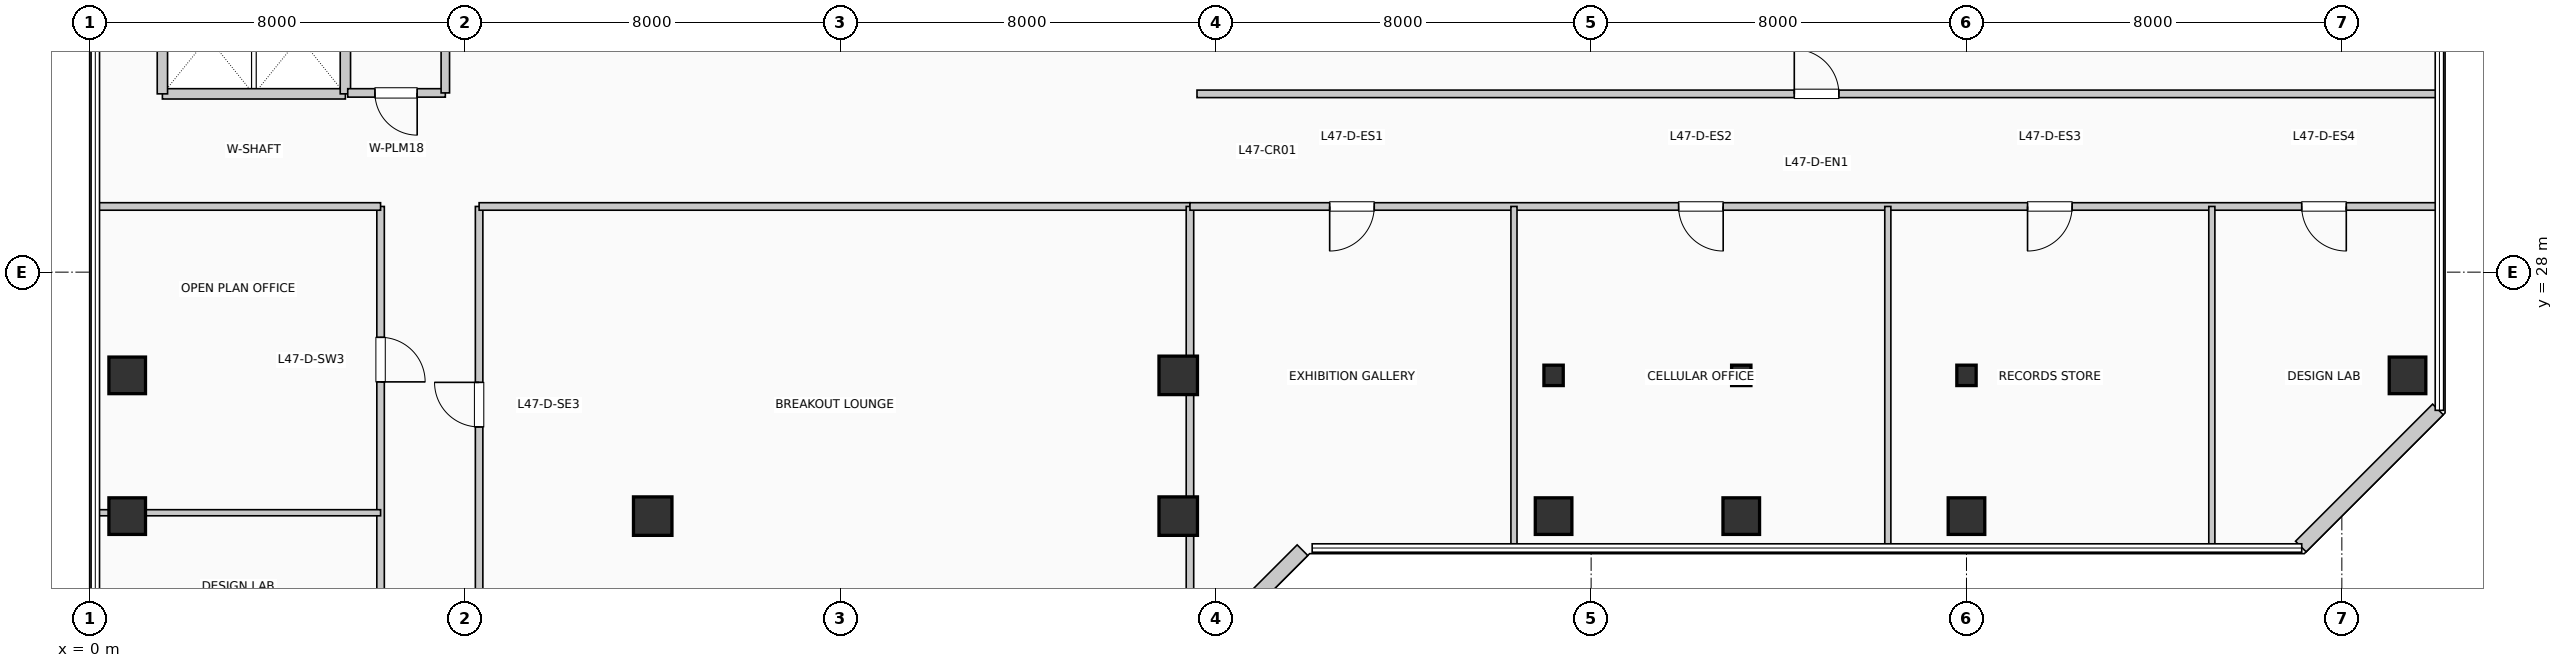
"""IFC4 building model, lengths in metres.
Left out: names, types, materials, properties, quantities, classifications, styles, units other than length and angle.
Written with IfcOpenShell. Run it as: python <this file> out.ifc"""

import sys

from ifc_helpers import new_model, si_unit, direction, frame, frame_2d, origin, origin_2d, place, context, subcontext, project, spatial, rectangle, i_section, extrude, element, fill, save


model = new_model("IFC4")
c1 = context("Model", 3, precision=1e-05, world=origin(), true_north=direction((0.0, 1.0)))
c2 = subcontext(c1, "Body", "Model", "MODEL_VIEW")
j1 = project(units=[si_unit("LENGTHUNIT", "METRE"), si_unit("PLANEANGLEUNIT", "RADIAN")], contexts=[c1])
p1 = place(None, origin())
s1 = spatial("IfcSite", under=j1, at=p1, CompositionType="ELEMENT")
p2 = place(p1, origin())
s2 = spatial("IfcBuilding", under=s1, at=p2, CompositionType="ELEMENT")
p3 = place(p2, frame((0.0, 0.0, 195.36)))
s3 = spatial("IfcBuildingStorey", under=s2, at=p3, CompositionType="ELEMENT", Elevation=195.36)
for number, where, z_axis, x_axis in (
    (1, (0.8, 22.8, 0.0), (0.0, 0.0, 1.0), (1.0, 0.0, 0.0)),
    (2, (0.8, 25.8, 0.0), (0.0, 0.0, 1.0), (1.0, 0.0, 0.0)),
):
    element("IfcColumn", number, at=place(p3, frame(where, z_axis=z_axis, x_axis=x_axis)), inside=s3, PredefinedType="COLUMN", context=c2, shape_type="SweptSolid", body=[
        extrude(rectangle(XDim=0.78, YDim=0.78, at=origin_2d()), origin(), (0.0, 0.0, 1.0), 3.96),
    ])
for number, where, z_axis, x_axis in (
    (3, (12.0, 22.8, 0.0), (0.0, 0.0, 1.0), (1.0, 0.0, 0.0)),
    (4, (23.2, 22.8, 0.0), (0.0, 0.0, 1.0), (1.0, 0.0, 0.0)),
    (5, (23.2, 25.8, 0.0), (0.0, 0.0, 1.0), (1.0, 0.0, 0.0)),
):
    element("IfcColumn", number, at=place(p3, frame(where, z_axis=z_axis, x_axis=x_axis)), inside=s3, PredefinedType="COLUMN", context=c2, shape_type="SweptSolid", body=[
        extrude(rectangle(XDim=0.82, YDim=0.82, at=origin_2d()), origin(), (0.0, 0.0, 1.0), 3.96),
    ])
p4 = place(p3, frame((31.2, 22.8, 0.0), z_axis=(0.0, 0.0, 1.0), x_axis=(1.0, 0.0, 0.0)))
e6 = element("IfcColumn", 6, at=p4, inside=s3, PredefinedType="COLUMN", context=c2, shape_type="SweptSolid", body=[
    extrude(rectangle(XDim=0.78, YDim=0.78, at=origin_2d()), origin(), (0.0, 0.0, 1.0), 3.96),
])
p5 = place(p3, frame((31.2, 25.8, 0.0), z_axis=(0.0, 0.0, 1.0), x_axis=(1.0, 0.0, 0.0)))
e7 = element("IfcColumn", 7, at=p5, inside=s3, PredefinedType="COLUMN", context=c2, shape_type="SweptSolid", body=[
    extrude(i_section(OverallWidth=0.412, OverallDepth=0.435, WebThickness=0.027, FlangeThickness=0.043, at=origin_2d()), origin(), (0.0, 0.0, 1.0), 3.96),
])
p6 = place(p3, frame((35.2, 22.8, 0.0), z_axis=(0.0, 0.0, 1.0), x_axis=(1.0, 0.0, 0.0)))
e8 = element("IfcColumn", 8, at=p6, inside=s3, PredefinedType="COLUMN", context=c2, shape_type="SweptSolid", body=[
    extrude(rectangle(XDim=0.78, YDim=0.78, at=origin_2d()), origin(), (0.0, 0.0, 1.0), 3.96),
])
p7 = place(p3, frame((35.2, 25.8, 0.0), z_axis=(0.0, 0.0, 1.0), x_axis=(1.0, 0.0, 0.0)))
e9 = element("IfcColumn", 9, at=p7, inside=s3, PredefinedType="COLUMN", context=c2, shape_type="SweptSolid", body=[
    extrude(i_section(OverallWidth=0.412, OverallDepth=0.435, WebThickness=0.027, FlangeThickness=0.043, at=origin_2d()), origin(), (0.0, 0.0, 1.0), 3.96),
])
p8 = place(p3, frame((40.0, 22.8, 0.0), z_axis=(0.0, 0.0, 1.0), x_axis=(1.0, 0.0, 0.0)))
e10 = element("IfcColumn", 10, at=p8, inside=s3, PredefinedType="COLUMN", context=c2, shape_type="SweptSolid", body=[
    extrude(rectangle(XDim=0.78, YDim=0.78, at=origin_2d()), origin(), (0.0, 0.0, 1.0), 3.96),
])
p9 = place(p3, frame((40.0, 25.8, 0.0), z_axis=(0.0, 0.0, 1.0), x_axis=(1.0, 0.0, 0.0)))
e11 = element("IfcColumn", 11, at=p9, inside=s3, PredefinedType="COLUMN", context=c2, shape_type="SweptSolid", body=[
    extrude(i_section(OverallWidth=0.412, OverallDepth=0.435, WebThickness=0.027, FlangeThickness=0.043, at=origin_2d()), origin(), (0.0, 0.0, 1.0), 3.96),
])
p10 = place(p3, frame((49.4, 25.8, 0.0), z_axis=(0.0, 0.0, 1.0), x_axis=(1.0, 0.0, 0.0)))
e12 = element("IfcColumn", 12, at=p10, inside=s3, PredefinedType="COLUMN", context=c2, shape_type="SweptSolid", body=[
    extrude(rectangle(XDim=0.78, YDim=0.78, at=origin_2d()), origin(), (0.0, 0.0, 1.0), 3.96),
])
p11 = place(p3, frame((23.926, 20.152, 0.0), z_axis=(0.0, 0.0, 1.0), x_axis=(0.707106781187, 0.707106781187, 0.0)))
e13 = element("IfcWall", 13, at=p11, inside=s3, PredefinedType="SOLIDWALL", context=c2, shape_type="SweptSolid", body=[
    extrude(rectangle(XDim=2.718, YDim=0.32, at=frame_2d((1.359, 0.0))), origin(), (0.0, 0.0, 1.0), 3.71),
])
p12 = place(p3, frame((47.126, 22.152, 0.0), z_axis=(0.0, 0.0, 1.0), x_axis=(0.707136318428, 0.707077242712, 0.0)))
e14 = element("IfcWall", 14, at=p12, inside=s3, PredefinedType="SOLIDWALL", context=c2, shape_type="SweptSolid", body=[
    extrude(rectangle(XDim=4.133, YDim=0.32, at=frame_2d((2.066, 0.0))), origin(), (0.0, 0.0, 1.0), 3.71),
])
p13 = place(p3, frame((1.55, 31.8, 0.0), z_axis=(0.0, 0.0, 1.0), x_axis=(1.0, 0.0, 0.0)))
e15 = element("IfcWall", 15, at=p13, inside=s3, PredefinedType="PARTITIONING", context=c2, shape_type="SweptSolid", body=[
    extrude(rectangle(XDim=3.9, YDim=0.22, at=frame_2d((1.95, 0.0))), origin(), (0.0, 0.0, 1.0), 3.71),
])
for number, where, z_axis, x_axis in (
    (16, (1.55, 31.8, 0.0), (0.0, 0.0, 1.0), (0.0, 1.0, 0.0)),
    (17, (5.45, 31.8, 0.0), (0.0, 0.0, 1.0), (0.0, 1.0, 0.0)),
):
    element("IfcWall", number, at=place(p3, frame(where, z_axis=z_axis, x_axis=x_axis)), inside=s3, PredefinedType="PARTITIONING", context=c2, shape_type="SweptSolid", body=[
        extrude(rectangle(XDim=2.38, YDim=0.22, at=frame_2d((1.19, 0.0))), origin(), (0.0, 0.0, 1.0), 3.71),
    ])
p14 = place(p3, frame((5.5, 31.82, 0.0), z_axis=(0.0, 0.0, 1.0), x_axis=(1.0, 0.0, 0.0)))
e18 = element("IfcWall", 18, at=p14, inside=s3, PredefinedType="PLUMBINGWALL", context=c2, shape_type="SweptSolid", body=[
    extrude(rectangle(XDim=2.08, YDim=0.18, at=frame_2d((1.04, 0.0))), origin(), (0.0, 0.0, 1.0), 3.71),
])
p15 = place(p14, frame((1.48, 0.0, 0.0), z_axis=(0.0, 0.0, 1.0), x_axis=(-1.0, 0.0, 0.0)))
e19 = element("IfcOpeningElement", 19, at=p15, cuts=e18, PredefinedType="OPENING", context=c2, shape_type="SweptSolid", body=[
    extrude(rectangle(XDim=0.9, YDim=2.1, at=frame_2d((0.45, 1.05))), frame((0.0, 0.1, 0.0), z_axis=(0.0, -1.0, 0.0), x_axis=(1.0, 0.0, 0.0)), (0.0, 0.0, 1.0), 0.2),
])
p16 = place(p3, frame((7.58, 31.82, 0.0), z_axis=(0.0, 0.0, 1.0), x_axis=(0.0, 1.0, 0.0)))
e20 = element("IfcWall", 20, at=p16, inside=s3, PredefinedType="PLUMBINGWALL", context=c2, shape_type="SweptSolid", body=[
    extrude(rectangle(XDim=2.36, YDim=0.18, at=frame_2d((1.18, 0.0))), origin(), (0.0, 0.0, 1.0), 3.71),
])
p17 = place(p3, frame((6.2, 10.2, 0.0), z_axis=(0.0, 0.0, 1.0), x_axis=(0.0, 1.0, 0.0)))
e21 = element("IfcWall", 21, at=p17, inside=s3, PredefinedType="PARTITIONING", context=c2, shape_type="SweptSolid", body=[
    extrude(rectangle(XDim=19.2, YDim=0.16, at=frame_2d((9.6, 0.0))), origin(), (0.0, 0.0, 1.0), 3.71),
])
p18 = place(p17, frame((3.739, 0.0, 0.0), z_axis=(0.0, 0.0, 1.0), x_axis=(-1.0, 0.0, 0.0)))
e22 = element("IfcOpeningElement", 22, at=p18, cuts=e21, PredefinedType="OPENING", context=c2, shape_type="SweptSolid", body=[
    extrude(rectangle(XDim=0.95, YDim=2.15, at=frame_2d((0.475, 1.075))), frame((0.0, 0.09, 0.0), z_axis=(0.0, -1.0, 0.0), x_axis=(1.0, 0.0, 0.0)), (0.0, 0.0, 1.0), 0.18),
])
p19 = place(p17, frame((10.075, 0.0, 0.0), z_axis=(0.0, 0.0, 1.0), x_axis=(-1.0, 0.0, 0.0)))
e23 = element("IfcOpeningElement", 23, at=p19, cuts=e21, PredefinedType="OPENING", context=c2, shape_type="SweptSolid", body=[
    extrude(rectangle(XDim=0.95, YDim=2.15, at=frame_2d((0.475, 1.075))), frame((0.0, 0.09, 0.0), z_axis=(0.0, -1.0, 0.0), x_axis=(1.0, 0.0, 0.0)), (0.0, 0.0, 1.0), 0.18),
])
p20 = place(p17, frame((16.411, 0.0, 0.0), z_axis=(0.0, 0.0, 1.0), x_axis=(-1.0, 0.0, 0.0)))
e24 = element("IfcOpeningElement", 24, at=p20, cuts=e21, PredefinedType="OPENING", context=c2, shape_type="SweptSolid", body=[
    extrude(rectangle(XDim=0.95, YDim=2.15, at=frame_2d((0.475, 1.075))), frame((0.0, 0.09, 0.0), z_axis=(0.0, -1.0, 0.0), x_axis=(1.0, 0.0, 0.0)), (0.0, 0.0, 1.0), 0.18),
])
p21 = place(p3, frame((8.3, 10.2, 0.0), z_axis=(0.0, 0.0, 1.0), x_axis=(0.0, 1.0, 0.0)))
e25 = element("IfcWall", 25, at=p21, inside=s3, PredefinedType="PARTITIONING", context=c2, shape_type="SweptSolid", body=[
    extrude(rectangle(XDim=19.2, YDim=0.16, at=frame_2d((9.6, 0.0))), origin(), (0.0, 0.0, 1.0), 3.71),
])
p22 = place(p21, frame((1.925, 0.0, 0.0)))
e26 = element("IfcOpeningElement", 26, at=p22, cuts=e25, PredefinedType="OPENING", context=c2, shape_type="SweptSolid", body=[
    extrude(rectangle(XDim=0.95, YDim=2.15, at=frame_2d((0.475, 1.075))), frame((0.0, 0.09, 0.0), z_axis=(0.0, -1.0, 0.0), x_axis=(1.0, 0.0, 0.0)), (0.0, 0.0, 1.0), 0.18),
])
p23 = place(p21, frame((7.301, 0.0, 0.0)))
e27 = element("IfcOpeningElement", 27, at=p23, cuts=e25, PredefinedType="OPENING", context=c2, shape_type="SweptSolid", body=[
    extrude(rectangle(XDim=0.95, YDim=2.15, at=frame_2d((0.475, 1.075))), frame((0.0, 0.09, 0.0), z_axis=(0.0, -1.0, 0.0), x_axis=(1.0, 0.0, 0.0)), (0.0, 0.0, 1.0), 0.18),
])
p24 = place(p21, frame((14.501, 0.0, 0.0)))
e28 = element("IfcOpeningElement", 28, at=p24, cuts=e25, PredefinedType="OPENING", context=c2, shape_type="SweptSolid", body=[
    extrude(rectangle(XDim=0.95, YDim=2.15, at=frame_2d((0.475, 1.075))), frame((0.0, 0.09, 0.0), z_axis=(0.0, -1.0, 0.0), x_axis=(1.0, 0.0, 0.0)), (0.0, 0.0, 1.0), 0.18),
])
p25 = place(p3, frame((0.19, 29.4, 0.0), z_axis=(0.0, 0.0, 1.0), x_axis=(1.0, 0.0, 0.0)))
e29 = element("IfcWall", 29, at=p25, inside=s3, PredefinedType="PARTITIONING", context=c2, shape_type="SweptSolid", body=[
    extrude(rectangle(XDim=6.01, YDim=0.16, at=frame_2d((3.005, 0.0))), origin(), (0.0, 0.0, 1.0), 3.365),
])
p26 = place(p3, frame((8.3, 29.4, 0.0), z_axis=(0.0, 0.0, 1.0), x_axis=(1.0, 0.0, 0.0)))
e30 = element("IfcWall", 30, at=p26, inside=s3, PredefinedType="PARTITIONING", context=c2, shape_type="SweptSolid", body=[
    extrude(rectangle(XDim=15.15, YDim=0.16, at=frame_2d((7.575, 0.0))), origin(), (0.0, 0.0, 1.0), 3.365),
])
p27 = place(p3, frame((23.45, 5.99, 0.0), z_axis=(0.0, 0.0, 1.0), x_axis=(0.0, 1.0, 0.0)))
e31 = element("IfcWall", 31, at=p27, inside=s3, PredefinedType="PARTITIONING", context=c2, shape_type="SweptSolid", body=[
    extrude(rectangle(XDim=23.41, YDim=0.16, at=frame_2d((11.705, 0.0))), origin(), (0.0, 0.0, 1.0), 3.095),
])
p28 = place(p3, frame((0.19, 22.872, 0.0), z_axis=(0.0, 0.0, 1.0), x_axis=(1.0, 0.0, 0.0)))
e32 = element("IfcWall", 32, at=p28, inside=s3, PredefinedType="PARTITIONING", context=c2, shape_type="SweptSolid", body=[
    extrude(rectangle(XDim=6.01, YDim=0.13, at=frame_2d((3.005, 0.0))), origin(), (0.0, 0.0, 1.0), 3.095),
])
p29 = place(p3, frame((23.45, 29.4, 0.0), z_axis=(0.0, 0.0, 1.0), x_axis=(1.0, 0.0, 0.0)))
e33 = element("IfcWall", 33, at=p29, inside=s3, PredefinedType="PARTITIONING", context=c2, shape_type="SweptSolid", body=[
    extrude(rectangle(XDim=26.56, YDim=0.16, at=frame_2d((13.28, 0.0))), origin(), (0.0, 0.0, 1.0), 3.365),
])
p30 = place(p29, frame((3.928, 0.0, 0.0), z_axis=(0.0, 0.0, 1.0), x_axis=(-1.0, 0.0, 0.0)))
e34 = element("IfcOpeningElement", 34, at=p30, cuts=e33, PredefinedType="OPENING", context=c2, shape_type="SweptSolid", body=[
    extrude(rectangle(XDim=0.95, YDim=2.15, at=frame_2d((0.475, 1.075))), frame((0.0, 0.09, 0.0), z_axis=(0.0, -1.0, 0.0), x_axis=(1.0, 0.0, 0.0)), (0.0, 0.0, 1.0), 0.18),
])
p31 = place(p29, frame((11.365, 0.0, 0.0), z_axis=(0.0, 0.0, 1.0), x_axis=(-1.0, 0.0, 0.0)))
e35 = element("IfcOpeningElement", 35, at=p31, cuts=e33, PredefinedType="OPENING", context=c2, shape_type="SweptSolid", body=[
    extrude(rectangle(XDim=0.95, YDim=2.15, at=frame_2d((0.475, 1.075))), frame((0.0, 0.09, 0.0), z_axis=(0.0, -1.0, 0.0), x_axis=(1.0, 0.0, 0.0)), (0.0, 0.0, 1.0), 0.18),
])
p32 = place(p29, frame((18.801, 0.0, 0.0), z_axis=(0.0, 0.0, 1.0), x_axis=(-1.0, 0.0, 0.0)))
e36 = element("IfcOpeningElement", 36, at=p32, cuts=e33, PredefinedType="OPENING", context=c2, shape_type="SweptSolid", body=[
    extrude(rectangle(XDim=0.95, YDim=2.15, at=frame_2d((0.475, 1.075))), frame((0.0, 0.09, 0.0), z_axis=(0.0, -1.0, 0.0), x_axis=(1.0, 0.0, 0.0)), (0.0, 0.0, 1.0), 0.18),
])
p33 = place(p29, frame((24.645, 0.0, 0.0), z_axis=(0.0, 0.0, 1.0), x_axis=(-1.0, 0.0, 0.0)))
e37 = element("IfcOpeningElement", 37, at=p33, cuts=e33, PredefinedType="OPENING", context=c2, shape_type="SweptSolid", body=[
    extrude(rectangle(XDim=0.95, YDim=2.15, at=frame_2d((0.475, 1.075))), frame((0.0, 0.09, 0.0), z_axis=(0.0, -1.0, 0.0), x_axis=(1.0, 0.0, 0.0)), (0.0, 0.0, 1.0), 0.18),
])
p34 = place(p3, frame((23.6, 31.8, 0.0), z_axis=(0.0, 0.0, 1.0), x_axis=(1.0, 0.0, 0.0)))
e38 = element("IfcWall", 38, at=p34, inside=s3, PredefinedType="PARTITIONING", context=c2, shape_type="SweptSolid", body=[
    extrude(rectangle(XDim=26.41, YDim=0.16, at=frame_2d((13.205, 0.0))), origin(), (0.0, 0.0, 1.0), 3.71),
])
p35 = place(p34, frame((12.73, 0.0, 0.0)))
e39 = element("IfcOpeningElement", 39, at=p35, cuts=e38, PredefinedType="OPENING", context=c2, shape_type="SweptSolid", body=[
    extrude(rectangle(XDim=0.95, YDim=2.15, at=frame_2d((0.475, 1.075))), frame((0.0, 0.09, 0.0), z_axis=(0.0, -1.0, 0.0), x_axis=(1.0, 0.0, 0.0)), (0.0, 0.0, 1.0), 0.18),
])
for number, where, z_axis, x_axis in (
    (40, (30.356, 22.19, 0.0), (0.0, 0.0, 1.0), (0.0, 1.0, 0.0)),
    (41, (38.323, 22.19, 0.0), (0.0, 0.0, 1.0), (0.0, 1.0, 0.0)),
    (42, (45.229, 22.19, 0.0), (0.0, 0.0, 1.0), (0.0, 1.0, 0.0)),
):
    element("IfcWall", number, at=place(p3, frame(where, z_axis=z_axis, x_axis=x_axis)), inside=s3, PredefinedType="PARTITIONING", context=c2, shape_type="SweptSolid", body=[
        extrude(rectangle(XDim=7.21, YDim=0.13, at=frame_2d((3.605, 0.0))), origin(), (0.0, 0.0, 1.0), 3.71),
    ])
p36 = place(p15, origin())
e43 = element("IfcDoor", 43, at=p36, inside=s3, OperationType="SINGLE_SWING_RIGHT", PredefinedType="DOOR", context=c2, shape_type="SweptSolid", body=[
    extrude(rectangle(XDim=0.9, YDim=2.1, at=frame_2d((0.45, 1.05))), frame((0.0, 0.025, 0.0), z_axis=(0.0, -1.0, 0.0), x_axis=(1.0, 0.0, 0.0)), (0.0, 0.0, 1.0), 0.05),
])
fill(e19, e43)
p37 = place(p20, origin())
e44 = element("IfcDoor", 44, at=p37, inside=s3, OperationType="SINGLE_SWING_LEFT", PredefinedType="DOOR", context=c2, shape_type="SweptSolid", body=[
    extrude(rectangle(XDim=0.95, YDim=2.15, at=frame_2d((0.475, 1.075))), frame((0.0, 0.025, 0.0), z_axis=(0.0, -1.0, 0.0), x_axis=(1.0, 0.0, 0.0)), (0.0, 0.0, 1.0), 0.05),
])
fill(e24, e44)
p38 = place(p24, origin())
e45 = element("IfcDoor", 45, at=p38, inside=s3, OperationType="SINGLE_SWING_RIGHT", PredefinedType="DOOR", context=c2, shape_type="SweptSolid", body=[
    extrude(rectangle(XDim=0.95, YDim=2.15, at=frame_2d((0.475, 1.075))), frame((0.0, 0.025, 0.0), z_axis=(0.0, -1.0, 0.0), x_axis=(1.0, 0.0, 0.0)), (0.0, 0.0, 1.0), 0.05),
])
fill(e28, e45)
p39 = place(p30, origin())
e46 = element("IfcDoor", 46, at=p39, inside=s3, OperationType="SINGLE_SWING_LEFT", PredefinedType="DOOR", context=c2, shape_type="SweptSolid", body=[
    extrude(rectangle(XDim=0.95, YDim=2.15, at=frame_2d((0.475, 1.075))), frame((0.0, 0.025, 0.0), z_axis=(0.0, -1.0, 0.0), x_axis=(1.0, 0.0, 0.0)), (0.0, 0.0, 1.0), 0.05),
])
fill(e34, e46)
p40 = place(p31, origin())
e47 = element("IfcDoor", 47, at=p40, inside=s3, OperationType="SINGLE_SWING_RIGHT", PredefinedType="DOOR", context=c2, shape_type="SweptSolid", body=[
    extrude(rectangle(XDim=0.95, YDim=2.15, at=frame_2d((0.475, 1.075))), frame((0.0, 0.025, 0.0), z_axis=(0.0, -1.0, 0.0), x_axis=(1.0, 0.0, 0.0)), (0.0, 0.0, 1.0), 0.05),
])
fill(e35, e47)
p41 = place(p32, origin())
e48 = element("IfcDoor", 48, at=p41, inside=s3, OperationType="SINGLE_SWING_LEFT", PredefinedType="DOOR", context=c2, shape_type="SweptSolid", body=[
    extrude(rectangle(XDim=0.95, YDim=2.15, at=frame_2d((0.475, 1.075))), frame((0.0, 0.025, 0.0), z_axis=(0.0, -1.0, 0.0), x_axis=(1.0, 0.0, 0.0)), (0.0, 0.0, 1.0), 0.05),
])
fill(e36, e48)
p42 = place(p33, origin())
e49 = element("IfcDoor", 49, at=p42, inside=s3, OperationType="SINGLE_SWING_RIGHT", PredefinedType="DOOR", context=c2, shape_type="SweptSolid", body=[
    extrude(rectangle(XDim=0.95, YDim=2.15, at=frame_2d((0.475, 1.075))), frame((0.0, 0.025, 0.0), z_axis=(0.0, -1.0, 0.0), x_axis=(1.0, 0.0, 0.0)), (0.0, 0.0, 1.0), 0.05),
])
fill(e37, e49)
p43 = place(p35, origin())
e50 = element("IfcDoor", 50, at=p43, inside=s3, OperationType="SINGLE_SWING_LEFT", PredefinedType="DOOR", context=c2, shape_type="SweptSolid", body=[
    extrude(rectangle(XDim=0.95, YDim=2.15, at=frame_2d((0.475, 1.075))), frame((0.0, 0.025, 0.0), z_axis=(0.0, -1.0, 0.0), x_axis=(1.0, 0.0, 0.0)), (0.0, 0.0, 1.0), 0.05),
])
fill(e39, e50)
save(model, sys.argv[1])
